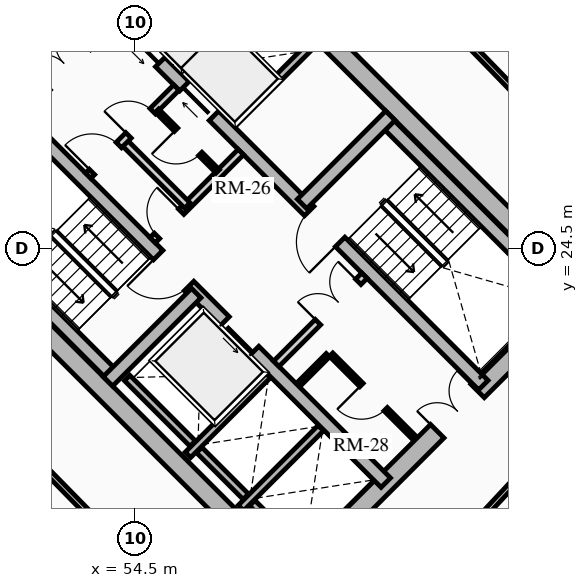
"""IFC4 building model, lengths in metres.
Left out: names, types, materials, properties, quantities, classifications, styles, units other than length and angle.
Written with IfcOpenShell. Run it as: python <this file> out.ifc"""

import sys

from ifc_helpers import new_model, si_unit, direction, frame, frame_2d, origin, place, context, subcontext, project, spatial, rectangle, extrude, source, transform, mapped, element, fill, save


model = new_model("IFC4")
c1 = context("Model", 3, precision=1e-05, world=origin(), true_north=direction((0.0, 1.0)))
c2 = subcontext(c1, "Body", "Model", "MODEL_VIEW")
j1 = project(units=[si_unit("LENGTHUNIT", "METRE"), si_unit("PLANEANGLEUNIT", "RADIAN")], contexts=[c1])
p1 = place(None, origin())
s1 = spatial("IfcSite", under=j1, at=p1, CompositionType="ELEMENT")
p2 = place(p1, origin())
s2 = spatial("IfcBuilding", under=s1, at=p2, CompositionType="ELEMENT")
p3 = place(p2, frame((0.0, 0.0, 45.28)))
s3 = spatial("IfcBuildingStorey", under=s2, at=p3, CompositionType="ELEMENT", Elevation=45.28)
for number, where, z_axis, x_axis in (
    (1, (58.773, 15.661, 0.0), (0.0, 0.0, 1.0), (-0.707, 0.707, 0.0)),
    (2, (66.339, 23.227, 0.0), (0.0, 0.0, 1.0), (-0.707, 0.707, 0.0)),
):
    element("IfcWall", number, at=place(p3, frame(where, z_axis=z_axis, x_axis=x_axis)), inside=s3, PredefinedType="SHEAR", context=c2, shape_type="SweptSolid", body=[
        extrude(rectangle(XDim=14.3, YDim=0.5, at=frame_2d((7.15, 0.0))), origin(), (0.0, 0.0, 1.0), 2.91),
    ])
p4 = place(p3, frame((58.596, 15.838, 0.0), z_axis=(0.0, 0.0, 1.0), x_axis=(0.707106781187, 0.707106781187, 0.0)))
e3 = element("IfcWall", 3, at=p4, inside=s3, PredefinedType="SHEAR", context=c2, shape_type="SweptSolid", body=[
    extrude(rectangle(XDim=10.7, YDim=0.5, at=frame_2d((5.35, 0.0))), origin(), (0.0, 0.0, 1.0), 2.91),
])
m1 = source(origin(), c2, "Body", "SweptSolid", [
    extrude(rectangle(XDim=1.5, YDim=2.02, at=frame_2d((0.75, 1.01))), frame((0.0, 0.26, 0.0), z_axis=(0.0, -1.0, 0.0), x_axis=(1.0, 0.0, 0.0)), (0.0, 0.0, 1.0), 0.52),
])
p5 = place(p4, frame((5.45, 0.0, 0.0)))
e4 = element("IfcOpeningElement", 4, at=p5, cuts=e3, PredefinedType="OPENING", context=c2, shape_type="MappedRepresentation", body=[
    mapped(m1, transform((0.0, 0.0, 0.0), x_axis=(1.0, 0.0, 0.0), y_axis=(0.0, 1.0, 0.0), z_axis=(0.0, 0.0, 1.0), scale=1.0)),
])
p6 = place(p3, frame((48.838, 25.596, 0.0), z_axis=(0.0, 0.0, 1.0), x_axis=(0.707106781187, 0.707106781187, 0.0)))
e5 = element("IfcWall", 5, at=p6, inside=s3, PredefinedType="SHEAR", context=c2, shape_type="SweptSolid", body=[
    extrude(rectangle(XDim=10.7, YDim=0.5, at=frame_2d((5.35, 0.0))), origin(), (0.0, 0.0, 1.0), 2.91),
])
p7 = place(p6, frame((4.6, 0.0, 0.0)))
e6 = element("IfcOpeningElement", 6, at=p7, cuts=e5, PredefinedType="OPENING", context=c2, shape_type="MappedRepresentation", body=[
    mapped(m1, transform((0.0, 0.0, 0.0), x_axis=(1.0, 0.0, 0.0), y_axis=(0.0, 1.0, 0.0), z_axis=(0.0, 0.0, 1.0), scale=1.0)),
])
p8 = place(p3, frame((61.096, 18.338, 0.0), z_axis=(0.0, 0.0, 1.0), x_axis=(-0.707106781187, 0.707106781187, 0.0)))
e7 = element("IfcWall", 7, at=p8, inside=s3, PredefinedType="SHEAR", context=c2, shape_type="SweptSolid", body=[
    extrude(rectangle(XDim=13.8, YDim=0.35, at=frame_2d((6.9, 0.0))), origin(), (0.0, 0.0, 1.0), 2.91),
])
m2 = source(origin(), c2, "Body", "SweptSolid", [
    extrude(rectangle(XDim=1.1, YDim=2.015, at=frame_2d((0.55, 1.007))), frame((0.0, 0.185, 0.0), z_axis=(0.0, -1.0, 0.0), x_axis=(1.0, 0.0, 0.0)), (0.0, 0.0, 1.0), 0.37),
])
p9 = place(p8, frame((4.9, 0.0, 0.0)))
e8 = element("IfcOpeningElement", 8, at=p9, cuts=e7, PredefinedType="OPENING", context=c2, shape_type="MappedRepresentation", body=[
    mapped(m2, transform((0.0, 0.0, 0.0), x_axis=(1.0, 0.0, 0.0), y_axis=(0.0, 1.0, 0.0), z_axis=(0.0, 0.0, 1.0), scale=1.0)),
])
m3 = source(origin(), c2, "Body", "SweptSolid", [
    extrude(rectangle(XDim=1.15, YDim=2.02, at=frame_2d((0.575, 1.01))), frame((0.0, 0.185, 0.0), z_axis=(0.0, -1.0, 0.0), x_axis=(1.0, 0.0, 0.0)), (0.0, 0.0, 1.0), 0.37),
])
p10 = place(p8, frame((7.32, 0.0, 0.0)))
e9 = element("IfcOpeningElement", 9, at=p10, cuts=e7, PredefinedType="OPENING", context=c2, shape_type="MappedRepresentation", body=[
    mapped(m3, transform((0.0, 0.0, 0.0), x_axis=(1.0, 0.0, 0.0), y_axis=(0.0, 1.0, 0.0), z_axis=(0.0, 0.0, 1.0), scale=1.0)),
])
p11 = place(p3, frame((63.662, 20.904, 0.0), z_axis=(0.0, 0.0, 1.0), x_axis=(-0.707106781187, 0.707106781187, 0.0)))
e10 = element("IfcWall", 10, at=p11, inside=s3, PredefinedType="SHEAR", context=c2, shape_type="SweptSolid", body=[
    extrude(rectangle(XDim=13.8, YDim=0.35, at=frame_2d((6.9, 0.0))), origin(), (0.0, 0.0, 1.0), 2.91),
])
p12 = place(p11, frame((10.025, 0.0, 0.0)))
e11 = element("IfcOpeningElement", 11, at=p12, cuts=e10, PredefinedType="OPENING", context=c2, shape_type="MappedRepresentation", body=[
    mapped(m2, transform((0.0, 0.0, 0.0), x_axis=(1.0, 0.0, 0.0), y_axis=(0.0, 1.0, 0.0), z_axis=(0.0, 0.0, 1.0), scale=1.0)),
])
p13 = place(p11, frame((12.025, 0.0, 0.0)))
e12 = element("IfcOpeningElement", 12, at=p13, cuts=e10, PredefinedType="OPENING", context=c2, shape_type="MappedRepresentation", body=[
    mapped(m2, transform((0.0, 0.0, 0.0), x_axis=(1.0, 0.0, 0.0), y_axis=(0.0, 1.0, 0.0), z_axis=(0.0, 0.0, 1.0), scale=1.0)),
])
p14 = place(p11, frame((5.33, 0.0, 0.0)))
e13 = element("IfcOpeningElement", 13, at=p14, cuts=e10, PredefinedType="OPENING", context=c2, shape_type="MappedRepresentation", body=[
    mapped(m3, transform((0.0, 0.0, 0.0), x_axis=(1.0, 0.0, 0.0), y_axis=(0.0, 1.0, 0.0), z_axis=(0.0, 0.0, 1.0), scale=1.0)),
])
p15 = place(p3, frame((53.922, 21.141, 0.0), z_axis=(0.0, 0.0, 1.0), x_axis=(-0.707106781187, 0.707106781187, 0.0)))
e14 = element("IfcWall", 14, at=p15, inside=s3, PredefinedType="SHEAR", context=c2, shape_type="SweptSolid", body=[
    extrude(rectangle(XDim=6.745, YDim=0.35, at=frame_2d((3.373, 0.0))), origin(), (0.0, 0.0, 1.0), 2.91),
])
p16 = place(p3, frame((53.784, 21.003, 0.0), z_axis=(0.0, 0.0, 1.0), x_axis=(0.707106781187, 0.707106781187, 0.0)))
e15 = element("IfcWall", 15, at=p16, inside=s3, PredefinedType="SHEAR", context=c2, shape_type="SweptSolid", body=[
    extrude(rectangle(XDim=3.285, YDim=0.35, at=frame_2d((1.643, 0.0))), origin(), (0.0, 0.0, 1.0), 2.91),
])
p17 = place(p3, frame((65.847, 23.089, 0.0), z_axis=(0.0, 0.0, 1.0), x_axis=(-0.707106781187, 0.707106781187, 0.0)))
e16 = element("IfcWall", 16, at=p17, inside=s3, PredefinedType="SHEAR", context=c2, shape_type="SweptSolid", body=[
    extrude(rectangle(XDim=6.745, YDim=0.35, at=frame_2d((3.373, 0.0))), origin(), (0.0, 0.0, 1.0), 2.91),
])
p18 = place(p3, frame((58.893, 25.674, 0.0), z_axis=(0.0, 0.0, 1.0), x_axis=(0.707106781187, 0.707106781187, 0.0)))
e17 = element("IfcWall", 17, at=p18, inside=s3, PredefinedType="SHEAR", context=c2, shape_type="SweptSolid", body=[
    extrude(rectangle(XDim=3.285, YDim=0.35, at=frame_2d((1.643, 0.0))), origin(), (0.0, 0.0, 1.0), 2.91),
])
p19 = place(p3, frame((55.888, 19.069, 0.0), z_axis=(0.0, 0.0, 1.0), x_axis=(0.707106781187, 0.707106781187, 0.0)))
e18 = element("IfcWall", 18, at=p19, inside=s3, PredefinedType="SHEAR", context=c2, shape_type="SweptSolid", body=[
    extrude(rectangle(XDim=2.97, YDim=0.2, at=frame_2d((1.485, 0.0))), origin(), (0.0, 0.0, 1.0), 2.91),
])
p20 = place(p3, frame((56.015, 19.366, 0.0), z_axis=(0.0, 0.0, 1.0), x_axis=(-0.707106781187, 0.707106781187, 0.0)))
e19 = element("IfcWall", 19, at=p20, inside=s3, PredefinedType="SHEAR", context=c2, shape_type="SweptSolid", body=[
    extrude(rectangle(XDim=2.44, YDim=0.2, at=frame_2d((1.22, 0.0))), origin(), (0.0, 0.0, 1.0), 2.91),
])
p21 = place(p3, frame((57.284, 17.673, 0.0), z_axis=(0.0, 0.0, 1.0), x_axis=(0.707147878904, 0.70706568108, 0.0)))
e20 = element("IfcWall", 20, at=p21, inside=s3, PredefinedType="SHEAR", context=c2, shape_type="SweptSolid", body=[
    extrude(rectangle(XDim=2.97, YDim=0.2, at=frame_2d((1.485, 0.0))), origin(), (0.0, 0.0, 1.0), 2.91),
])
p22 = place(p3, frame((57.412, 17.97, 0.0), z_axis=(0.0, 0.0, 1.0), x_axis=(-0.707106781187, 0.707106781187, 0.0)))
e21 = element("IfcWall", 21, at=p22, inside=s3, PredefinedType="SHEAR", context=c2, shape_type="SweptSolid", body=[
    extrude(rectangle(XDim=1.735, YDim=0.2, at=frame_2d((0.867, 0.0))), origin(), (0.0, 0.0, 1.0), 2.91),
])
p23 = place(p3, frame((58.737, 16.644, 0.0), z_axis=(0.0, 0.0, 1.0), x_axis=(-0.707032117043, 0.707181437447, 0.0)))
e22 = element("IfcWall", 22, at=p23, inside=s3, PredefinedType="SHEAR", context=c2, shape_type="SweptSolid", body=[
    extrude(rectangle(XDim=1.635, YDim=0.2, at=frame_2d((0.817, 0.0))), origin(), (0.0, 0.0, 1.0), 2.91),
])
p24 = place(p3, frame((57.062, 27.781, 0.0), z_axis=(0.0, 0.0, 1.0), x_axis=(0.707106781187, 0.707106781187, 0.0)))
e23 = element("IfcWall", 23, at=p24, inside=s3, PredefinedType="SHEAR", context=c2, shape_type="SweptSolid", body=[
    extrude(rectangle(XDim=2.97, YDim=0.2, at=frame_2d((1.485, 0.0))), origin(), (0.0, 0.0, 1.0), 2.91),
])
p25 = place(p3, frame((55.615, 29.227, 0.0), z_axis=(0.0, 0.0, 1.0), x_axis=(0.707147878904, 0.70706568108, 0.0)))
e24 = element("IfcWall", 24, at=p25, inside=s3, PredefinedType="SHEAR", context=c2, shape_type="SweptSolid", body=[
    extrude(rectangle(XDim=2.97, YDim=0.2, at=frame_2d((1.485, 0.0))), origin(), (0.0, 0.0, 1.0), 2.91),
])
p26 = place(p3, frame((58.214, 21.467, 0.0), z_axis=(0.0, 0.0, 1.0), x_axis=(0.707106781187, 0.707106781187, 0.0)))
e25 = element("IfcWall", 25, at=p26, inside=s3, PredefinedType="PARTITIONING", context=c2, shape_type="SweptSolid", body=[
    extrude(rectangle(XDim=3.28, YDim=0.2, at=frame_2d((1.64, 0.0))), origin(), (0.0, 0.0, 1.0), 2.635),
])
m4 = source(origin(), c2, "Body", "SweptSolid", [
    extrude(rectangle(XDim=1.5, YDim=2.02, at=frame_2d((0.75, 1.01))), frame((0.0, 0.11, 0.0), z_axis=(0.0, -1.0, 0.0), x_axis=(1.0, 0.0, 0.0)), (0.0, 0.0, 1.0), 0.22),
])
p27 = place(p26, frame((1.55, 0.0, 0.0)))
e26 = element("IfcOpeningElement", 26, at=p27, cuts=e25, PredefinedType="OPENING", context=c2, shape_type="MappedRepresentation", body=[
    mapped(m4, transform((0.0, 0.0, 0.0), x_axis=(1.0, 0.0, 0.0), y_axis=(0.0, 1.0, 0.0), z_axis=(0.0, 0.0, 1.0), scale=1.0)),
])
p28 = place(p3, frame((54.961, 24.719, 0.0), z_axis=(0.0, 0.0, 1.0), x_axis=(0.707106781187, 0.707106781187, 0.0)))
e27 = element("IfcWall", 27, at=p28, inside=s3, PredefinedType="PARTITIONING", context=c2, shape_type="SweptSolid", body=[
    extrude(rectangle(XDim=3.28, YDim=0.2, at=frame_2d((1.64, 0.0))), origin(), (0.0, 0.0, 1.0), 2.635),
])
m5 = source(origin(), c2, "Body", "SweptSolid", [
    extrude(rectangle(XDim=0.9, YDim=2.005, at=frame_2d((0.45, 1.002))), frame((0.0, 0.11, 0.0), z_axis=(0.0, -1.0, 0.0), x_axis=(1.0, 0.0, 0.0)), (0.0, 0.0, 1.0), 0.22),
])
p29 = place(p28, frame((0.16, 0.0, 0.0)))
e28 = element("IfcOpeningElement", 28, at=p29, cuts=e27, PredefinedType="OPENING", context=c2, shape_type="MappedRepresentation", body=[
    mapped(m5, transform((0.0, 0.0, 0.0), x_axis=(1.0, 0.0, 0.0), y_axis=(0.0, 1.0, 0.0), z_axis=(0.0, 0.0, 1.0), scale=1.0)),
])
p30 = place(p3, frame((55.874, 25.631, 0.0), z_axis=(0.0, 0.0, 1.0), x_axis=(-0.707157639372, 0.707055919343, 0.0)))
e29 = element("IfcWall", 29, at=p30, inside=s3, PredefinedType="PARTITIONING", context=c2, shape_type="SweptSolid", body=[
    extrude(rectangle(XDim=2.4, YDim=0.2, at=frame_2d((1.2, 0.0))), origin(), (0.0, 0.0, 1.0), 2.635),
])
p31 = place(p3, frame((53.264, 26.416, 0.0), z_axis=(0.0, 0.0, 1.0), x_axis=(0.707106781187, 0.707106781187, 0.0)))
e30 = element("IfcWall", 30, at=p31, inside=s3, PredefinedType="PARTITIONING", context=c2, shape_type="SweptSolid", body=[
    extrude(rectangle(XDim=3.28, YDim=0.2, at=frame_2d((1.64, 0.0))), origin(), (0.0, 0.0, 1.0), 2.635),
])
m6 = source(origin(), c2, "Body", "SweptSolid", [
    extrude(rectangle(XDim=1.0, YDim=2.015, at=frame_2d((0.5, 1.007))), frame((0.0, 0.11, 0.0), z_axis=(0.0, -1.0, 0.0), x_axis=(1.0, 0.0, 0.0)), (0.0, 0.0, 1.0), 0.22),
])
p32 = place(p31, frame((0.14, 0.0, 0.0)))
e31 = element("IfcOpeningElement", 31, at=p32, cuts=e30, PredefinedType="OPENING", context=c2, shape_type="MappedRepresentation", body=[
    mapped(m6, transform((0.0, 0.0, 0.0), x_axis=(1.0, 0.0, 0.0), y_axis=(0.0, 1.0, 0.0), z_axis=(0.0, 0.0, 1.0), scale=1.0)),
])
p33 = place(p31, frame((1.5, 0.0, 0.0)))
e32 = element("IfcOpeningElement", 32, at=p33, cuts=e30, PredefinedType="OPENING", context=c2, shape_type="MappedRepresentation", body=[
    mapped(m5, transform((0.0, 0.0, 0.0), x_axis=(1.0, 0.0, 0.0), y_axis=(0.0, 1.0, 0.0), z_axis=(0.0, 0.0, 1.0), scale=1.0)),
])
p34 = place(p3, frame((61.835, 19.529, 0.0), z_axis=(0.0, 0.0, 1.0), x_axis=(-0.707146413884, 0.707067146267, 0.0)))
e33 = element("IfcWall", 33, at=p34, inside=s3, PredefinedType="PARTITIONING", context=c2, shape_type="SweptSolid", body=[
    extrude(rectangle(XDim=3.08, YDim=0.125, at=frame_2d((1.54, 0.0))), origin(), (0.0, 0.0, 1.0), 2.635),
])
m7 = source(origin(), c2, "Body", "SweptSolid", [
    extrude(rectangle(XDim=0.9, YDim=2.005, at=frame_2d((0.45, 1.002))), frame((0.0, 0.073, 0.0), z_axis=(0.0, -1.0, 0.0), x_axis=(1.0, 0.0, 0.0)), (0.0, 0.0, 1.0), 0.145),
])
p35 = place(p34, frame((1.05, 0.0, 0.0)))
e34 = element("IfcOpeningElement", 34, at=p35, cuts=e33, PredefinedType="OPENING", context=c2, shape_type="MappedRepresentation", body=[
    mapped(m7, transform((0.0, 0.0, 0.0), x_axis=(1.0, 0.0, 0.0), y_axis=(0.0, 1.0, 0.0), z_axis=(0.0, 0.0, 1.0), scale=1.0)),
])
p36 = place(p3, frame((58.794, 20.915, 0.0), z_axis=(0.0, 0.0, 1.0), x_axis=(0.707106781187, 0.707106781187, 0.0)))
e35 = element("IfcWall", 35, at=p36, inside=s3, PredefinedType="PARTITIONING", context=c2, shape_type="SweptSolid", body=[
    extrude(rectangle(XDim=1.1, YDim=0.125, at=frame_2d((0.55, 0.0))), origin(), (0.0, 0.0, 1.0), 2.635),
])
p37 = place(p3, frame((56.673, 26.529, 0.0), z_axis=(0.0, 0.0, 1.0), x_axis=(-0.707052764397, 0.70716079385, 0.0)))
e36 = element("IfcWall", 36, at=p37, inside=s3, PredefinedType="PARTITIONING", context=c2, shape_type="SweptSolid", body=[
    extrude(rectangle(XDim=2.26, YDim=0.125, at=frame_2d((1.13, 0.0))), origin(), (0.0, 0.0, 1.0), 2.635),
])
p38 = place(p37, frame((0.65, 0.0, 0.0)))
e37 = element("IfcOpeningElement", 37, at=p38, cuts=e36, PredefinedType="OPENING", context=c2, shape_type="MappedRepresentation", body=[
    mapped(m7, transform((0.0, 0.0, 0.0), x_axis=(1.0, 0.0, 0.0), y_axis=(0.0, 1.0, 0.0), z_axis=(0.0, 0.0, 1.0), scale=1.0)),
])
p39 = place(p3, frame((51.914, 18.914, 0.0), z_axis=(0.0, 0.0, 1.0), x_axis=(0.699999313799, -0.714143515465, 0.0)))
e38 = element("IfcWall", 38, at=p39, inside=s3, PredefinedType="PARTITIONING", context=c2, shape_type="SweptSolid", body=[
    extrude(rectangle(XDim=6.162, YDim=0.15, at=frame_2d((3.081, 0.0))), origin(), (0.0, 0.0, 1.0), 2.159),
])
p40 = place(p3, frame((62.903, 16.667, 0.0), z_axis=(0.0, 0.0, 1.0), x_axis=(0.682371947497, 0.731005147225, 0.0)))
e39 = element("IfcWall", 39, at=p40, inside=s3, PredefinedType="PARTITIONING", context=c2, shape_type="SweptSolid", body=[
    extrude(rectangle(XDim=6.642, YDim=0.15, at=frame_2d((3.321, 0.0))), origin(), (0.0, 0.0, 1.0), 2.159),
])
p41 = place(p3, frame((67.27, 25.78, 0.0), z_axis=(0.0, 0.0, 1.0), x_axis=(-0.696847842907, 0.717218992942, 0.0)))
e40 = element("IfcWall", 40, at=p41, inside=s3, PredefinedType="PARTITIONING", context=c2, shape_type="SweptSolid", body=[
    extrude(rectangle(XDim=6.004, YDim=0.15, at=frame_2d((3.002, 0.0))), origin(), (0.0, 0.0, 1.0), 2.635),
])
m8 = source(origin(), c2, "Body", "SweptSolid", [
    extrude(rectangle(XDim=1.0, YDim=2.015, at=frame_2d((0.5, 1.007))), frame((0.0, 0.085, 0.0), z_axis=(0.0, -1.0, 0.0), x_axis=(1.0, 0.0, 0.0)), (0.0, 0.0, 1.0), 0.17),
])
p42 = place(p41, frame((2.502, 0.0, 0.0)))
e41 = element("IfcOpeningElement", 41, at=p42, cuts=e40, PredefinedType="OPENING", context=c2, shape_type="MappedRepresentation", body=[
    mapped(m8, transform((0.0, 0.0, 0.0), x_axis=(1.0, 0.0, 0.0), y_axis=(0.0, 1.0, 0.0), z_axis=(0.0, 0.0, 1.0), scale=1.0)),
])
m9 = source(origin(), c2, "Body", "SweptSolid", [
    extrude(rectangle(XDim=1.1, YDim=2.015, at=frame_2d((0.55, 1.007))), frame((0.0, 0.025, 0.0), z_axis=(0.0, -1.0, 0.0), x_axis=(1.0, 0.0, 0.0)), (0.0, 0.0, 1.0), 0.05),
])
p43 = place(p9, origin())
e42 = element("IfcDoor", 42, at=p43, inside=s3, OperationType="SLIDING_TO_LEFT", PredefinedType="DOOR", context=c2, shape_type="MappedRepresentation", body=[
    mapped(m9, transform((0.0, 0.0, 0.0), x_axis=(1.0, 0.0, 0.0), y_axis=(0.0, 1.0, 0.0), z_axis=(0.0, 0.0, 1.0), scale=1.0)),
])
fill(e8, e42)
p44 = place(p12, origin())
e43 = element("IfcDoor", 43, at=p44, inside=s3, OperationType="SLIDING_TO_RIGHT", PredefinedType="DOOR", context=c2, shape_type="MappedRepresentation", body=[
    mapped(m9, transform((0.0, 0.0, 0.0), x_axis=(1.0, 0.0, 0.0), y_axis=(0.0, 1.0, 0.0), z_axis=(0.0, 0.0, 1.0), scale=1.0)),
])
fill(e11, e43)
p45 = place(p13, origin())
e44 = element("IfcDoor", 44, at=p45, inside=s3, OperationType="SLIDING_TO_LEFT", PredefinedType="DOOR", context=c2, shape_type="MappedRepresentation", body=[
    mapped(m9, transform((0.0, 0.0, 0.0), x_axis=(1.0, 0.0, 0.0), y_axis=(0.0, 1.0, 0.0), z_axis=(0.0, 0.0, 1.0), scale=1.0)),
])
fill(e12, e44)
m10 = source(origin(), c2, "Body", "SweptSolid", [
    extrude(rectangle(XDim=1.15, YDim=2.02, at=frame_2d((0.575, 1.01))), frame((0.0, 0.025, 0.0), z_axis=(0.0, -1.0, 0.0), x_axis=(1.0, 0.0, 0.0)), (0.0, 0.0, 1.0), 0.05),
])
p46 = place(p10, origin())
e45 = element("IfcDoor", 45, at=p46, inside=s3, OperationType="SINGLE_SWING_RIGHT", PredefinedType="DOOR", context=c2, shape_type="MappedRepresentation", body=[
    mapped(m10, transform((0.0, 0.0, 0.0), x_axis=(1.0, 0.0, 0.0), y_axis=(0.0, 1.0, 0.0), z_axis=(0.0, 0.0, 1.0), scale=1.0)),
])
fill(e9, e45)
p47 = place(p14, origin())
e46 = element("IfcDoor", 46, at=p47, inside=s3, OperationType="SINGLE_SWING_LEFT", PredefinedType="DOOR", context=c2, shape_type="MappedRepresentation", body=[
    mapped(m10, transform((0.0, 0.0, 0.0), x_axis=(1.0, 0.0, 0.0), y_axis=(0.0, 1.0, 0.0), z_axis=(0.0, 0.0, 1.0), scale=1.0)),
])
fill(e13, e46)
m11 = source(origin(), c2, "Body", "SweptSolid", [
    extrude(rectangle(XDim=1.5, YDim=2.02, at=frame_2d((0.75, 1.01))), frame((0.0, 0.025, 0.0), z_axis=(0.0, -1.0, 0.0), x_axis=(1.0, 0.0, 0.0)), (0.0, 0.0, 1.0), 0.05),
])
p48 = place(p7, origin())
e47 = element("IfcDoor", 47, at=p48, inside=s3, OperationType="DOUBLE_DOOR_SINGLE_SWING", PredefinedType="DOOR", context=c2, shape_type="MappedRepresentation", body=[
    mapped(m11, transform((0.0, 0.0, 0.0), x_axis=(1.0, 0.0, 0.0), y_axis=(0.0, 1.0, 0.0), z_axis=(0.0, 0.0, 1.0), scale=1.0)),
])
fill(e6, e47)
p49 = place(p5, origin())
e48 = element("IfcDoor", 48, at=p49, inside=s3, OperationType="DOUBLE_DOOR_SINGLE_SWING", PredefinedType="DOOR", context=c2, shape_type="MappedRepresentation", body=[
    mapped(m11, transform((0.0, 0.0, 0.0), x_axis=(1.0, 0.0, 0.0), y_axis=(0.0, 1.0, 0.0), z_axis=(0.0, 0.0, 1.0), scale=1.0)),
])
fill(e4, e48)
p50 = place(p27, origin())
e49 = element("IfcDoor", 49, at=p50, inside=s3, OperationType="DOUBLE_DOOR_SINGLE_SWING", PredefinedType="DOOR", context=c2, shape_type="MappedRepresentation", body=[
    mapped(m11, transform((0.0, 0.0, 0.0), x_axis=(1.0, 0.0, 0.0), y_axis=(0.0, 1.0, 0.0), z_axis=(0.0, 0.0, 1.0), scale=1.0)),
])
fill(e26, e49)
m12 = source(origin(), c2, "Body", "SweptSolid", [
    extrude(rectangle(XDim=0.9, YDim=2.005, at=frame_2d((0.45, 1.002))), frame((0.0, 0.025, 0.0), z_axis=(0.0, -1.0, 0.0), x_axis=(1.0, 0.0, 0.0)), (0.0, 0.0, 1.0), 0.05),
])
p51 = place(p29, origin())
e50 = element("IfcDoor", 50, at=p51, inside=s3, OperationType="SINGLE_SWING_RIGHT", PredefinedType="DOOR", context=c2, shape_type="MappedRepresentation", body=[
    mapped(m12, transform((0.0, 0.0, 0.0), x_axis=(1.0, 0.0, 0.0), y_axis=(0.0, 1.0, 0.0), z_axis=(0.0, 0.0, 1.0), scale=1.0)),
])
fill(e28, e50)
m13 = source(origin(), c2, "Body", "SweptSolid", [
    extrude(rectangle(XDim=1.0, YDim=2.015, at=frame_2d((0.5, 1.007))), frame((0.0, 0.025, 0.0), z_axis=(0.0, -1.0, 0.0), x_axis=(1.0, 0.0, 0.0)), (0.0, 0.0, 1.0), 0.05),
])
p52 = place(p32, origin())
e51 = element("IfcDoor", 51, at=p52, inside=s3, OperationType="SINGLE_SWING_LEFT", PredefinedType="DOOR", context=c2, shape_type="MappedRepresentation", body=[
    mapped(m13, transform((0.0, 0.0, 0.0), x_axis=(1.0, 0.0, 0.0), y_axis=(0.0, 1.0, 0.0), z_axis=(0.0, 0.0, 1.0), scale=1.0)),
])
fill(e31, e51)
p53 = place(p35, origin())
e52 = element("IfcDoor", 52, at=p53, inside=s3, OperationType="SINGLE_SWING_RIGHT", PredefinedType="DOOR", context=c2, shape_type="MappedRepresentation", body=[
    mapped(m12, transform((0.0, 0.0, 0.0), x_axis=(1.0, 0.0, 0.0), y_axis=(0.0, 1.0, 0.0), z_axis=(0.0, 0.0, 1.0), scale=1.0)),
])
fill(e34, e52)
p54 = place(p33, origin())
e53 = element("IfcDoor", 53, at=p54, inside=s3, OperationType="SINGLE_SWING_LEFT", PredefinedType="DOOR", context=c2, shape_type="MappedRepresentation", body=[
    mapped(m12, transform((0.0, 0.0, 0.0), x_axis=(1.0, 0.0, 0.0), y_axis=(0.0, 1.0, 0.0), z_axis=(0.0, 0.0, 1.0), scale=1.0)),
])
fill(e32, e53)
p55 = place(p38, origin())
e54 = element("IfcDoor", 54, at=p55, inside=s3, OperationType="SINGLE_SWING_RIGHT", PredefinedType="DOOR", context=c2, shape_type="MappedRepresentation", body=[
    mapped(m12, transform((0.0, 0.0, 0.0), x_axis=(1.0, 0.0, 0.0), y_axis=(0.0, 1.0, 0.0), z_axis=(0.0, 0.0, 1.0), scale=1.0)),
])
fill(e37, e54)
save(model, sys.argv[1])
